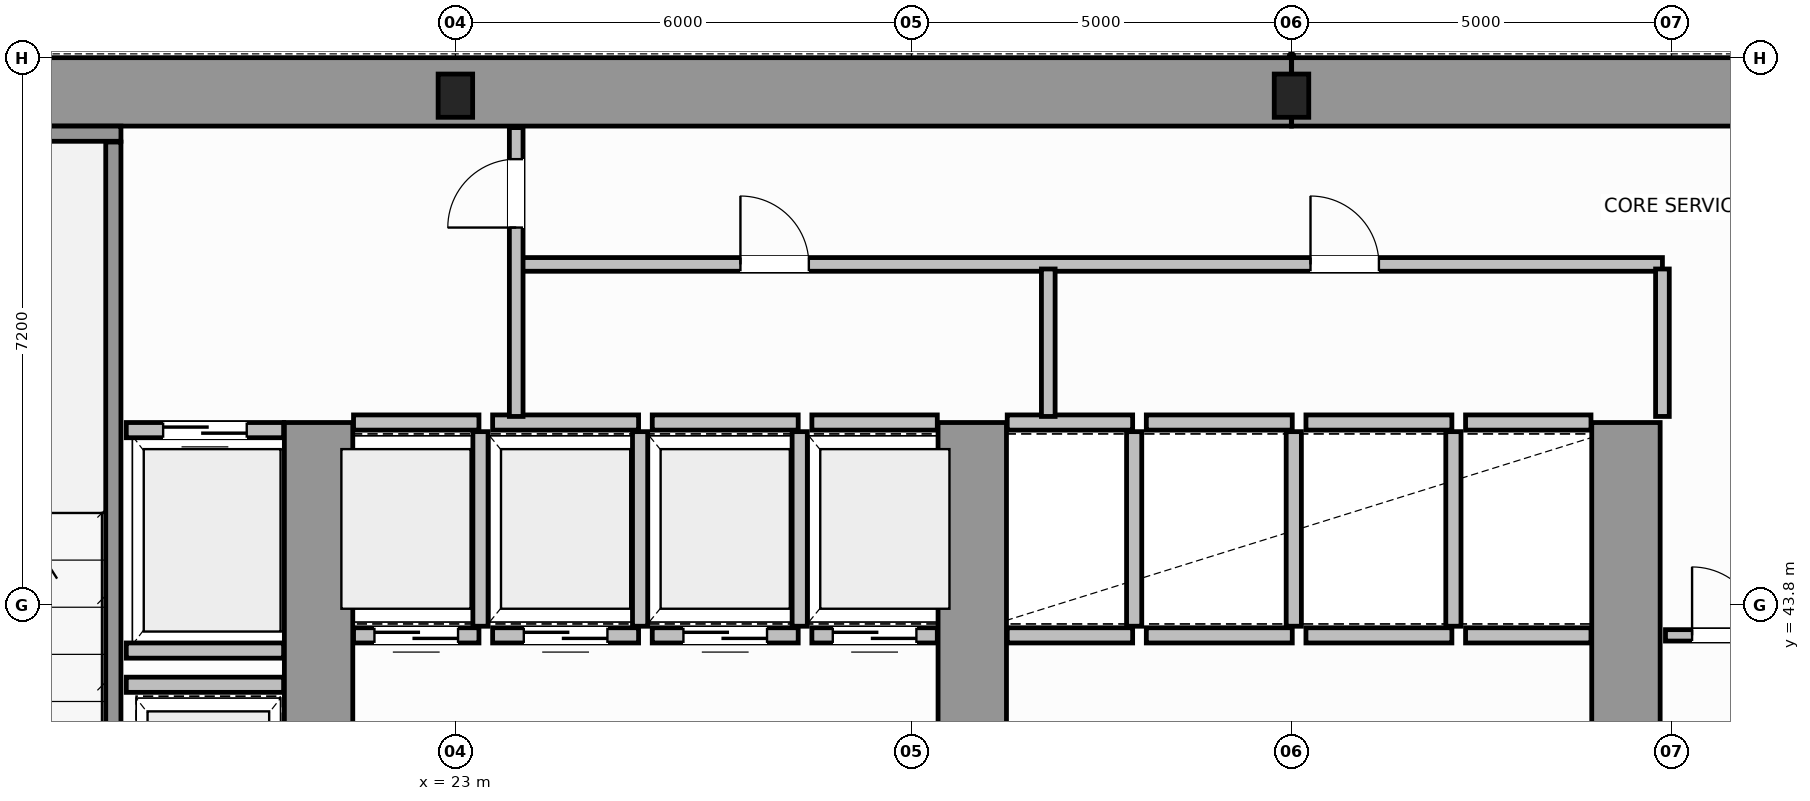
"""IFC4 building model, lengths in metres.
Left out: names, types, materials, properties, quantities, classifications, styles, units other than length and angle.
Written with IfcOpenShell. Run it as: python <this file> out.ifc"""

import sys

from ifc_helpers import new_model, si_unit, direction, frame, frame_2d, origin, origin_2d, place, context, subcontext, project, spatial, rectangle, i_section, extrude, source, transform, mapped, element, fill, save


model = new_model("IFC4")
c1 = context("Model", 3, precision=1e-05, world=origin(), true_north=direction((0.0, 1.0)))
c2 = subcontext(c1, "Body", "Model", "MODEL_VIEW")
j1 = project(units=[si_unit("LENGTHUNIT", "METRE"), si_unit("PLANEANGLEUNIT", "RADIAN")], contexts=[c1])
p1 = place(None, origin())
s1 = spatial("IfcSite", under=j1, at=p1, CompositionType="ELEMENT")
p2 = place(p1, origin())
s2 = spatial("IfcBuilding", under=s1, at=p2, CompositionType="ELEMENT")
p3 = place(p2, frame((0.0, 0.0, 30.2)))
s3 = spatial("IfcBuildingStorey", under=s2, at=p3, CompositionType="ELEMENT", Elevation=30.2)
m1 = source(origin(), c2, "Body", "SweptSolid", [
    extrude(i_section(OverallWidth=0.454, OverallDepth=0.569, WebThickness=0.078, FlangeThickness=0.08, FilletRadius=0.015, at=origin_2d()), origin(), (0.0, 0.0, 1.0), 3.8),
])
for number, where, z_axis, x_axis in (
    (1, (23.0, 50.5, 0.0), (0.0, 0.0, 1.0), (1.0, 0.0, 0.0)),
    (2, (34.0, 50.5, 0.0), (0.0, 0.0, 1.0), (1.0, 0.0, 0.0)),
):
    element("IfcColumn", number, at=place(p3, frame(where, z_axis=z_axis, x_axis=x_axis)), inside=s3, PredefinedType="COLUMN", context=c2, shape_type="MappedRepresentation", body=[
        mapped(m1, transform((0.0, 0.0, 0.0), scale=1.0)),
    ])
for number, where, z_axis, x_axis in (
    (3, (14.454, 50.55, 0.0), (0.0, 0.0, 1.0), (1.0, 0.0, 0.0)),
    (4, (34.002, 50.55, 0.0), (0.0, 0.0, 1.0), (1.0, 0.0, 0.0)),
):
    element("IfcWall", number, at=place(p3, frame(where, z_axis=z_axis, x_axis=x_axis)), inside=s3, PredefinedType="SHEAR", context=c2, shape_type="SweptSolid", body=[
        extrude(rectangle(XDim=19.544, YDim=0.9, at=frame_2d((9.772, 0.0))), origin(), (0.0, 0.0, 1.0), 3.8),
    ])
for number, where, z_axis, x_axis in (
    (5, (21.2, 36.97, 0.0), (0.0, 0.0, 1.0), (0.0, 1.0, 0.0)),
    (6, (29.8, 36.97, 0.0), (0.0, 0.0, 1.0), (0.0, 1.0, 0.0)),
    (7, (38.4, 36.97, 0.0), (0.0, 0.0, 1.0), (0.0, 1.0, 0.0)),
):
    element("IfcWall", number, at=place(p3, frame(where, z_axis=z_axis, x_axis=x_axis)), inside=s3, PredefinedType="SHEAR", context=c2, shape_type="SweptSolid", body=[
        extrude(rectangle(XDim=9.23, YDim=0.9, at=frame_2d((4.615, 0.0))), origin(), (0.0, 0.0, 1.0), 3.8),
    ])
p4 = place(p3, frame((14.45, 50.0, 0.0), z_axis=(0.0, 0.0, 1.0), x_axis=(1.0, 0.0, 0.0)))
e8 = element("IfcWall", 8, at=p4, inside=s3, PredefinedType="SOLIDWALL", context=c2, shape_type="SweptSolid", body=[
    extrude(rectangle(XDim=4.15, YDim=0.2, at=frame_2d((2.075, 0.0))), origin(), (0.0, 0.0, 1.0), 3.8),
])
p5 = place(p3, frame((18.5, 39.96, 0.0), z_axis=(0.0, 0.0, 1.0), x_axis=(0.0, 1.0, 0.0)))
e9 = element("IfcWall", 9, at=p5, inside=s3, PredefinedType="SOLIDWALL", context=c2, shape_type="SweptSolid", body=[
    extrude(rectangle(XDim=9.93, YDim=0.2, at=frame_2d((4.965, 0.0))), origin(), (0.0, 0.0, 1.0), 3.8),
])
p6 = place(p3, frame((21.66, 43.4, 0.0), z_axis=(0.0, 0.0, 1.0), x_axis=(1.0, 0.0, 0.0)))
e10 = element("IfcWall", 10, at=p6, inside=s3, PredefinedType="SOLIDWALL", context=c2, shape_type="SweptSolid", body=[
    extrude(rectangle(XDim=1.65, YDim=0.2, at=frame_2d((0.825, 0.0))), origin(), (0.0, 0.0, 1.0), 3.58),
])
p7 = place(p6, frame((0.275, 0.0, 0.0)))
e11 = element("IfcOpeningElement", 11, at=p7, cuts=e10, PredefinedType="OPENING", context=c2, shape_type="SweptSolid", body=[
    extrude(rectangle(XDim=1.1, YDim=2.15, at=frame_2d((0.55, 1.075))), frame((0.0, 0.11, 0.0), z_axis=(0.0, -1.0, 0.0), x_axis=(1.0, 0.0, 0.0)), (0.0, 0.0, 1.0), 0.22),
])
p8 = place(p3, frame((21.66, 46.2, 0.0), z_axis=(0.0, 0.0, 1.0), x_axis=(1.0, 0.0, 0.0)))
e12 = element("IfcWall", 12, at=p8, inside=s3, PredefinedType="SOLIDWALL", context=c2, shape_type="SweptSolid", body=[
    extrude(rectangle(XDim=1.65, YDim=0.2, at=frame_2d((0.825, 0.0))), origin(), (0.0, 0.0, 1.0), 3.58),
])
p9 = place(p3, frame((23.33, 43.52, 0.0), z_axis=(0.0, 0.0, 1.0), x_axis=(0.0, 1.0, 0.0)))
e13 = element("IfcWall", 13, at=p9, inside=s3, PredefinedType="SOLIDWALL", context=c2, shape_type="SweptSolid", body=[
    extrude(rectangle(XDim=2.56, YDim=0.2, at=frame_2d((1.28, 0.0))), origin(), (0.0, 0.0, 1.0), 3.58),
])
p10 = place(p3, frame((23.49, 43.4, 0.0), z_axis=(0.0, 0.0, 1.0), x_axis=(1.0, 0.0, 0.0)))
e14 = element("IfcWall", 14, at=p10, inside=s3, PredefinedType="SOLIDWALL", context=c2, shape_type="SweptSolid", body=[
    extrude(rectangle(XDim=1.92, YDim=0.2, at=frame_2d((0.96, 0.0))), origin(), (0.0, 0.0, 1.0), 3.58),
])
p11 = place(p10, frame((0.41, 0.0, 0.0)))
e15 = element("IfcOpeningElement", 15, at=p11, cuts=e14, PredefinedType="OPENING", context=c2, shape_type="SweptSolid", body=[
    extrude(rectangle(XDim=1.1, YDim=2.15, at=frame_2d((0.55, 1.075))), frame((0.0, 0.11, 0.0), z_axis=(0.0, -1.0, 0.0), x_axis=(1.0, 0.0, 0.0)), (0.0, 0.0, 1.0), 0.22),
])
p12 = place(p3, frame((23.49, 46.2, 0.0), z_axis=(0.0, 0.0, 1.0), x_axis=(1.0, 0.0, 0.0)))
e16 = element("IfcWall", 16, at=p12, inside=s3, PredefinedType="SOLIDWALL", context=c2, shape_type="SweptSolid", body=[
    extrude(rectangle(XDim=1.92, YDim=0.2, at=frame_2d((0.96, 0.0))), origin(), (0.0, 0.0, 1.0), 3.58),
])
p13 = place(p3, frame((25.43, 43.52, 0.0), z_axis=(0.0, 0.0, 1.0), x_axis=(0.0, 1.0, 0.0)))
e17 = element("IfcWall", 17, at=p13, inside=s3, PredefinedType="SOLIDWALL", context=c2, shape_type="SweptSolid", body=[
    extrude(rectangle(XDim=2.56, YDim=0.2, at=frame_2d((1.28, 0.0))), origin(), (0.0, 0.0, 1.0), 3.58),
])
p14 = place(p3, frame((25.59, 43.4, 0.0), z_axis=(0.0, 0.0, 1.0), x_axis=(1.0, 0.0, 0.0)))
e18 = element("IfcWall", 18, at=p14, inside=s3, PredefinedType="SOLIDWALL", context=c2, shape_type="SweptSolid", body=[
    extrude(rectangle(XDim=1.92, YDim=0.2, at=frame_2d((0.96, 0.0))), origin(), (0.0, 0.0, 1.0), 3.58),
])
p15 = place(p14, frame((0.41, 0.0, 0.0)))
e19 = element("IfcOpeningElement", 19, at=p15, cuts=e18, PredefinedType="OPENING", context=c2, shape_type="SweptSolid", body=[
    extrude(rectangle(XDim=1.1, YDim=2.15, at=frame_2d((0.55, 1.075))), frame((0.0, 0.11, 0.0), z_axis=(0.0, -1.0, 0.0), x_axis=(1.0, 0.0, 0.0)), (0.0, 0.0, 1.0), 0.22),
])
p16 = place(p3, frame((25.59, 46.2, 0.0), z_axis=(0.0, 0.0, 1.0), x_axis=(1.0, 0.0, 0.0)))
e20 = element("IfcWall", 20, at=p16, inside=s3, PredefinedType="SOLIDWALL", context=c2, shape_type="SweptSolid", body=[
    extrude(rectangle(XDim=1.92, YDim=0.2, at=frame_2d((0.96, 0.0))), origin(), (0.0, 0.0, 1.0), 3.58),
])
p17 = place(p3, frame((27.53, 43.52, 0.0), z_axis=(0.0, 0.0, 1.0), x_axis=(0.0, 1.0, 0.0)))
e21 = element("IfcWall", 21, at=p17, inside=s3, PredefinedType="SOLIDWALL", context=c2, shape_type="SweptSolid", body=[
    extrude(rectangle(XDim=2.56, YDim=0.2, at=frame_2d((1.28, 0.0))), origin(), (0.0, 0.0, 1.0), 3.58),
])
p18 = place(p3, frame((27.69, 43.4, 0.0), z_axis=(0.0, 0.0, 1.0), x_axis=(1.0, 0.0, 0.0)))
e22 = element("IfcWall", 22, at=p18, inside=s3, PredefinedType="SOLIDWALL", context=c2, shape_type="SweptSolid", body=[
    extrude(rectangle(XDim=1.65, YDim=0.2, at=frame_2d((0.825, 0.0))), origin(), (0.0, 0.0, 1.0), 3.58),
])
p19 = place(p18, frame((0.275, 0.0, 0.0)))
e23 = element("IfcOpeningElement", 23, at=p19, cuts=e22, PredefinedType="OPENING", context=c2, shape_type="SweptSolid", body=[
    extrude(rectangle(XDim=1.1, YDim=2.15, at=frame_2d((0.55, 1.075))), frame((0.0, 0.11, 0.0), z_axis=(0.0, -1.0, 0.0), x_axis=(1.0, 0.0, 0.0)), (0.0, 0.0, 1.0), 0.22),
])
p20 = place(p3, frame((27.69, 46.2, 0.0), z_axis=(0.0, 0.0, 1.0), x_axis=(1.0, 0.0, 0.0)))
e24 = element("IfcWall", 24, at=p20, inside=s3, PredefinedType="SOLIDWALL", context=c2, shape_type="SweptSolid", body=[
    extrude(rectangle(XDim=1.65, YDim=0.2, at=frame_2d((0.825, 0.0))), origin(), (0.0, 0.0, 1.0), 3.58),
])
for number, where, z_axis, x_axis in (
    (25, (30.26, 43.4, 0.0), (0.0, 0.0, 1.0), (1.0, 0.0, 0.0)),
    (26, (30.26, 46.2, 0.0), (0.0, 0.0, 1.0), (1.0, 0.0, 0.0)),
):
    element("IfcWall", number, at=place(p3, frame(where, z_axis=z_axis, x_axis=x_axis)), inside=s3, PredefinedType="SOLIDWALL", context=c2, shape_type="SweptSolid", body=[
        extrude(rectangle(XDim=1.65, YDim=0.2, at=frame_2d((0.825, 0.0))), origin(), (0.0, 0.0, 1.0), 3.58),
    ])
p21 = place(p3, frame((31.93, 43.52, 0.0), z_axis=(0.0, 0.0, 1.0), x_axis=(0.0, 1.0, 0.0)))
e27 = element("IfcWall", 27, at=p21, inside=s3, PredefinedType="SOLIDWALL", context=c2, shape_type="SweptSolid", body=[
    extrude(rectangle(XDim=2.56, YDim=0.2, at=frame_2d((1.28, 0.0))), origin(), (0.0, 0.0, 1.0), 3.58),
])
for number, where, z_axis, x_axis in (
    (28, (32.09, 43.4, 0.0), (0.0, 0.0, 1.0), (1.0, 0.0, 0.0)),
    (29, (32.09, 46.2, 0.0), (0.0, 0.0, 1.0), (1.0, 0.0, 0.0)),
):
    element("IfcWall", number, at=place(p3, frame(where, z_axis=z_axis, x_axis=x_axis)), inside=s3, PredefinedType="SOLIDWALL", context=c2, shape_type="SweptSolid", body=[
        extrude(rectangle(XDim=1.92, YDim=0.2, at=frame_2d((0.96, 0.0))), origin(), (0.0, 0.0, 1.0), 3.58),
    ])
p22 = place(p3, frame((34.03, 43.52, 0.0), z_axis=(0.0, 0.0, 1.0), x_axis=(0.0, 1.0, 0.0)))
e30 = element("IfcWall", 30, at=p22, inside=s3, PredefinedType="SOLIDWALL", context=c2, shape_type="SweptSolid", body=[
    extrude(rectangle(XDim=2.56, YDim=0.2, at=frame_2d((1.28, 0.0))), origin(), (0.0, 0.0, 1.0), 3.58),
])
for number, where, z_axis, x_axis in (
    (31, (34.19, 43.4, 0.0), (0.0, 0.0, 1.0), (1.0, 0.0, 0.0)),
    (32, (34.19, 46.2, 0.0), (0.0, 0.0, 1.0), (1.0, 0.0, 0.0)),
):
    element("IfcWall", number, at=place(p3, frame(where, z_axis=z_axis, x_axis=x_axis)), inside=s3, PredefinedType="SOLIDWALL", context=c2, shape_type="SweptSolid", body=[
        extrude(rectangle(XDim=1.92, YDim=0.2, at=frame_2d((0.96, 0.0))), origin(), (0.0, 0.0, 1.0), 3.58),
    ])
p23 = place(p3, frame((36.13, 43.52, 0.0), z_axis=(0.0, 0.0, 1.0), x_axis=(0.0, 1.0, 0.0)))
e33 = element("IfcWall", 33, at=p23, inside=s3, PredefinedType="SOLIDWALL", context=c2, shape_type="SweptSolid", body=[
    extrude(rectangle(XDim=2.56, YDim=0.2, at=frame_2d((1.28, 0.0))), origin(), (0.0, 0.0, 1.0), 3.58),
])
for number, where, z_axis, x_axis in (
    (34, (36.29, 43.4, 0.0), (0.0, 0.0, 1.0), (1.0, 0.0, 0.0)),
    (35, (36.29, 46.2, 0.0), (0.0, 0.0, 1.0), (1.0, 0.0, 0.0)),
):
    element("IfcWall", number, at=place(p3, frame(where, z_axis=z_axis, x_axis=x_axis)), inside=s3, PredefinedType="SOLIDWALL", context=c2, shape_type="SweptSolid", body=[
        extrude(rectangle(XDim=1.65, YDim=0.2, at=frame_2d((0.825, 0.0))), origin(), (0.0, 0.0, 1.0), 3.58),
    ])
p24 = place(p3, frame((18.67, 46.1, 0.0), z_axis=(0.0, 0.0, 1.0), x_axis=(1.0, 0.0, 0.0)))
e36 = element("IfcWall", 36, at=p24, inside=s3, PredefinedType="SOLIDWALL", context=c2, shape_type="SweptSolid", body=[
    extrude(rectangle(XDim=2.07, YDim=0.2, at=frame_2d((1.035, 0.0))), origin(), (0.0, 0.0, 1.0), 3.58),
])
p25 = place(p24, frame((0.485, 0.0, 0.0)))
e37 = element("IfcOpeningElement", 37, at=p25, cuts=e36, PredefinedType="OPENING", context=c2, shape_type="SweptSolid", body=[
    extrude(rectangle(XDim=1.1, YDim=2.15, at=frame_2d((0.55, 1.075))), frame((0.0, 0.11, 0.0), z_axis=(0.0, -1.0, 0.0), x_axis=(1.0, 0.0, 0.0)), (0.0, 0.0, 1.0), 0.22),
])
for number, where, z_axis, x_axis in (
    (38, (18.67, 43.2, 0.0), (0.0, 0.0, 1.0), (1.0, 0.0, 0.0)),
    (39, (18.67, 42.75, 0.0), (0.0, 0.0, 1.0), (1.0, 0.0, 0.0)),
):
    element("IfcWall", number, at=place(p3, frame(where, z_axis=z_axis, x_axis=x_axis)), inside=s3, PredefinedType="SOLIDWALL", context=c2, shape_type="SweptSolid", body=[
        extrude(rectangle(XDim=2.07, YDim=0.2, at=frame_2d((1.035, 0.0))), origin(), (0.0, 0.0, 1.0), 3.58),
    ])
p26 = place(p3, frame((38.92, 43.4, 0.0), z_axis=(0.0, 0.0, 1.0), x_axis=(1.0, 0.0, 0.0)))
e40 = element("IfcWall", 40, at=p26, inside=s3, PredefinedType="PARTITIONING", context=c2, shape_type="SweptSolid", body=[
    extrude(rectangle(XDim=1.6, YDim=0.15, at=frame_2d((0.8, 0.0))), origin(), (0.0, 0.0, 1.0), 3.58),
])
p27 = place(p26, frame((0.35, 0.0, 0.0)))
e41 = element("IfcOpeningElement", 41, at=p27, cuts=e40, PredefinedType="OPENING", context=c2, shape_type="SweptSolid", body=[
    extrude(rectangle(XDim=0.9, YDim=2.1, at=frame_2d((0.45, 1.05))), frame((0.0, 0.085, 0.0), z_axis=(0.0, -1.0, 0.0), x_axis=(1.0, 0.0, 0.0)), (0.0, 0.0, 1.0), 0.17),
])
p28 = place(p3, frame((23.85, 48.28, 0.0), z_axis=(0.0, 0.0, 1.0), x_axis=(1.0, 0.0, 0.0)))
e42 = element("IfcWall", 42, at=p28, inside=s3, PredefinedType="PLUMBINGWALL", context=c2, shape_type="SweptSolid", body=[
    extrude(rectangle(XDim=15.03, YDim=0.18, at=frame_2d((7.515, 0.0))), origin(), (0.0, 0.0, 1.0), 3.58),
])
p29 = place(p28, frame((2.9, 0.0, 0.0)))
e43 = element("IfcOpeningElement", 43, at=p29, cuts=e42, PredefinedType="OPENING", context=c2, shape_type="SweptSolid", body=[
    extrude(rectangle(XDim=0.9, YDim=2.15, at=frame_2d((0.45, 1.075))), frame((0.0, 0.1, 0.0), z_axis=(0.0, -1.0, 0.0), x_axis=(1.0, 0.0, 0.0)), (0.0, 0.0, 1.0), 0.2),
])
p30 = place(p28, frame((10.4, 0.0, 0.0)))
e44 = element("IfcOpeningElement", 44, at=p30, cuts=e42, PredefinedType="OPENING", context=c2, shape_type="SweptSolid", body=[
    extrude(rectangle(XDim=0.9, YDim=2.15, at=frame_2d((0.45, 1.075))), frame((0.0, 0.1, 0.0), z_axis=(0.0, -1.0, 0.0), x_axis=(1.0, 0.0, 0.0)), (0.0, 0.0, 1.0), 0.2),
])
p31 = place(p3, frame((23.8, 46.28, 0.0), z_axis=(0.0, 0.0, 1.0), x_axis=(0.0, 1.0, 0.0)))
e45 = element("IfcWall", 45, at=p31, inside=s3, PredefinedType="PLUMBINGWALL", context=c2, shape_type="SweptSolid", body=[
    extrude(rectangle(XDim=3.8, YDim=0.18, at=frame_2d((1.9, 0.0))), origin(), (0.0, 0.0, 1.0), 3.58),
])
p32 = place(p31, frame((2.485, 0.0, 0.0)))
e46 = element("IfcOpeningElement", 46, at=p32, cuts=e45, PredefinedType="OPENING", context=c2, shape_type="SweptSolid", body=[
    extrude(rectangle(XDim=0.9, YDim=2.15, at=frame_2d((0.45, 1.075))), frame((0.0, 0.1, 0.0), z_axis=(0.0, -1.0, 0.0), x_axis=(1.0, 0.0, 0.0)), (0.0, 0.0, 1.0), 0.2),
])
for number, where, z_axis, x_axis in (
    (47, (30.8, 46.28, 0.0), (0.0, 0.0, 1.0), (0.0, 1.0, 0.0)),
    (48, (38.88, 46.28, 0.0), (0.0, 0.0, 1.0), (0.0, 1.0, 0.0)),
):
    element("IfcWall", number, at=place(p3, frame(where, z_axis=z_axis, x_axis=x_axis)), inside=s3, PredefinedType="PLUMBINGWALL", context=c2, shape_type="SweptSolid", body=[
        extrude(rectangle(XDim=1.94, YDim=0.18, at=frame_2d((0.97, 0.0))), origin(), (0.0, 0.0, 1.0), 3.58),
    ])
m2 = source(origin(), c2, "Body", "SweptSolid", [
    extrude(rectangle(XDim=1.1, YDim=2.15, at=frame_2d((0.55, 1.075))), frame((0.0, 0.025, 0.0), z_axis=(0.0, -1.0, 0.0), x_axis=(1.0, 0.0, 0.0)), (0.0, 0.0, 1.0), 0.05),
])
p33 = place(p7, origin())
e49 = element("IfcDoor", 49, at=p33, inside=s3, OperationType="DOUBLE_DOOR_SLIDING", PredefinedType="DOOR", context=c2, shape_type="MappedRepresentation", body=[
    mapped(m2, transform((0.0, 0.0, 0.0), scale=1.0)),
])
fill(e11, e49)
p34 = place(p11, origin())
e50 = element("IfcDoor", 50, at=p34, inside=s3, OperationType="DOUBLE_DOOR_SLIDING", PredefinedType="DOOR", context=c2, shape_type="MappedRepresentation", body=[
    mapped(m2, transform((0.0, 0.0, 0.0), scale=1.0)),
])
fill(e15, e50)
p35 = place(p15, origin())
e51 = element("IfcDoor", 51, at=p35, inside=s3, OperationType="DOUBLE_DOOR_SLIDING", PredefinedType="DOOR", context=c2, shape_type="MappedRepresentation", body=[
    mapped(m2, transform((0.0, 0.0, 0.0), scale=1.0)),
])
fill(e19, e51)
p36 = place(p19, origin())
e52 = element("IfcDoor", 52, at=p36, inside=s3, OperationType="DOUBLE_DOOR_SLIDING", PredefinedType="DOOR", context=c2, shape_type="MappedRepresentation", body=[
    mapped(m2, transform((0.0, 0.0, 0.0), scale=1.0)),
])
fill(e23, e52)
p37 = place(p25, origin())
e53 = element("IfcDoor", 53, at=p37, inside=s3, OperationType="DOUBLE_DOOR_SLIDING", PredefinedType="DOOR", context=c2, shape_type="MappedRepresentation", body=[
    mapped(m2, transform((0.0, 0.0, 0.0), scale=1.0)),
])
fill(e37, e53)
m3 = source(origin(), c2, "Body", "SweptSolid", [
    extrude(rectangle(XDim=0.9, YDim=2.1, at=frame_2d((0.45, 1.05))), frame((0.0, 0.025, 0.0), z_axis=(0.0, -1.0, 0.0), x_axis=(1.0, 0.0, 0.0)), (0.0, 0.0, 1.0), 0.05),
])
p38 = place(p27, origin())
e54 = element("IfcDoor", 54, at=p38, inside=s3, OperationType="SINGLE_SWING_LEFT", PredefinedType="DOOR", context=c2, shape_type="MappedRepresentation", body=[
    mapped(m3, transform((0.0, 0.0, 0.0), scale=1.0)),
])
fill(e41, e54)
m4 = source(origin(), c2, "Body", "SweptSolid", [
    extrude(rectangle(XDim=0.9, YDim=2.15, at=frame_2d((0.45, 1.075))), frame((0.0, 0.025, 0.0), z_axis=(0.0, -1.0, 0.0), x_axis=(1.0, 0.0, 0.0)), (0.0, 0.0, 1.0), 0.05),
])
p39 = place(p32, origin())
e55 = element("IfcDoor", 55, at=p39, inside=s3, OperationType="SINGLE_SWING_LEFT", PredefinedType="DOOR", context=c2, shape_type="MappedRepresentation", body=[
    mapped(m4, transform((0.0, 0.0, 0.0), scale=1.0)),
])
fill(e46, e55)
p40 = place(p29, origin())
e56 = element("IfcDoor", 56, at=p40, inside=s3, OperationType="SINGLE_SWING_RIGHT", PredefinedType="DOOR", context=c2, shape_type="MappedRepresentation", body=[
    mapped(m4, transform((0.0, 0.0, 0.0), scale=1.0)),
])
fill(e43, e56)
p41 = place(p30, origin())
e57 = element("IfcDoor", 57, at=p41, inside=s3, OperationType="SINGLE_SWING_LEFT", PredefinedType="DOOR", context=c2, shape_type="MappedRepresentation", body=[
    mapped(m4, transform((0.0, 0.0, 0.0), scale=1.0)),
])
fill(e44, e57)
save(model, sys.argv[1])
